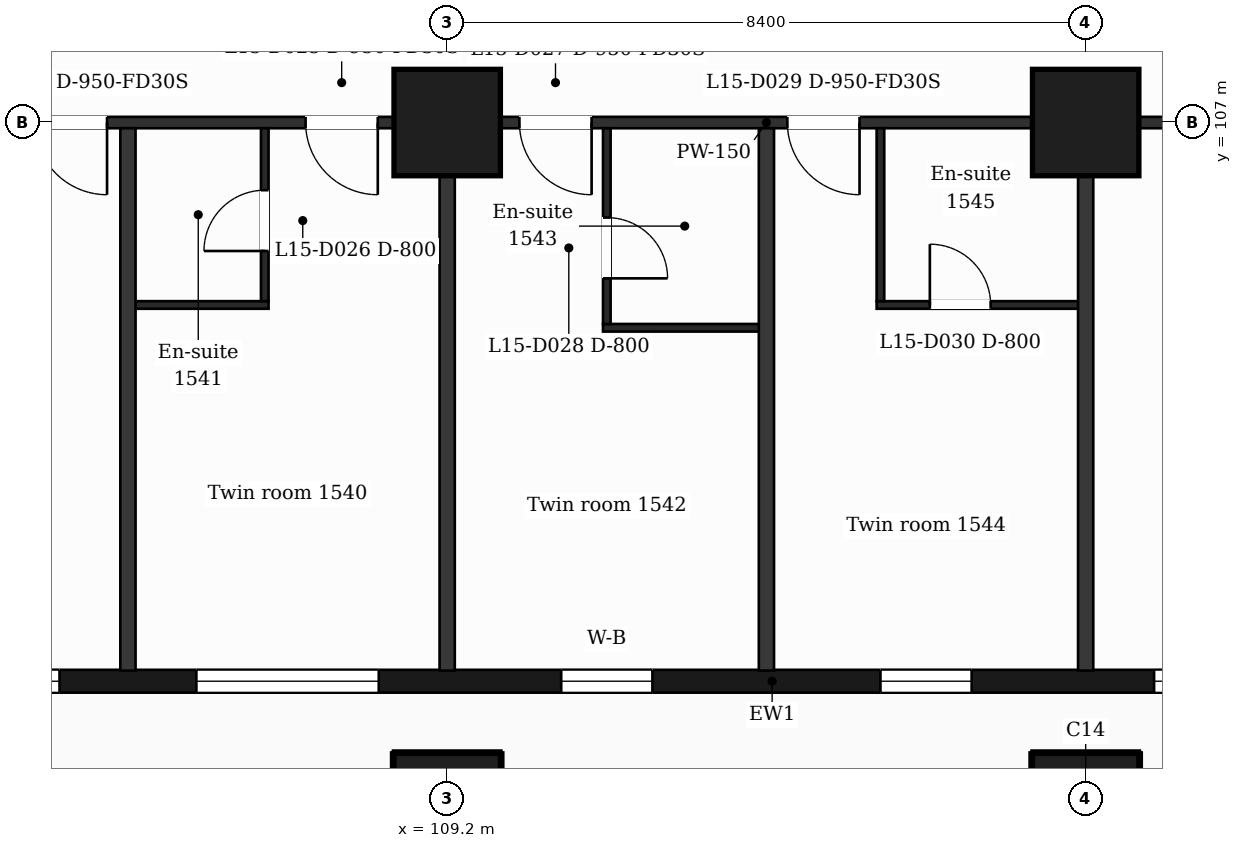
"""IFC4 building model, lengths in metres.
Left out: names, types, materials, properties, quantities, classifications, styles, units other than length and angle.
Written with IfcOpenShell. Run it as: python <this file> out.ifc"""

import sys

from ifc_helpers import new_model, si_unit, direction, frame, frame_2d, origin, origin_2d, place, context, subcontext, project, spatial, rectangle, extrude, element, fill, save


model = new_model("IFC4")
c1 = context("Model", 3, precision=1e-05, world=origin(), true_north=direction((0.0, 1.0)))
c2 = subcontext(c1, "Body", "Model", "MODEL_VIEW")
j1 = project(units=[si_unit("LENGTHUNIT", "METRE"), si_unit("PLANEANGLEUNIT", "RADIAN")], contexts=[c1])
p1 = place(None, origin())
s1 = spatial("IfcSite", under=j1, at=p1, CompositionType="ELEMENT")
p2 = place(p1, origin())
s2 = spatial("IfcBuilding", under=s1, at=p2, CompositionType="ELEMENT")
p3 = place(p2, frame((0.0, 0.0, 70.5)))
s3 = spatial("IfcBuildingStorey", under=s2, at=p3, CompositionType="ELEMENT", Elevation=70.5)
for number, where, z_axis, x_axis in (
    (1, (109.2, 98.0, 0.0), (0.0, 0.0, 1.0), (1.0, 0.0, 0.0)),
    (2, (117.6, 98.0, 0.0), (0.0, 0.0, 1.0), (1.0, 0.0, 0.0)),
    (3, (109.2, 107.0, 0.0), (0.0, 0.0, 1.0), (1.0, 0.0, 0.0)),
    (4, (117.6, 107.0, 0.0), (0.0, 0.0, 1.0), (1.0, 0.0, 0.0)),
):
    element("IfcColumn", number, at=place(p3, frame(where, z_axis=z_axis, x_axis=x_axis)), inside=s3, PredefinedType="COLUMN", context=c2, shape_type="SweptSolid", body=[
        extrude(rectangle(XDim=1.4, YDim=1.4, at=origin_2d()), origin(), (0.0, 0.0, 1.0), 3.5),
    ])
p4 = place(p3, frame((89.85, 99.65, 0.0), z_axis=(0.0, 0.0, 1.0), x_axis=(1.0, 0.0, 0.0)))
e5 = element("IfcWall", 5, at=p4, inside=s3, PredefinedType="SOLIDWALL", context=c2, shape_type="SweptSolid", body=[
    extrude(rectangle(XDim=47.25, YDim=0.3, at=frame_2d((23.625, 0.0))), origin(), (0.0, 0.0, 1.0), 3.18),
])
p5 = place(p4, frame((0.725, 0.0, 0.9)))
e6 = element("IfcOpeningElement", 6, at=p5, cuts=e5, PredefinedType="OPENING", context=c2, shape_type="SweptSolid", body=[
    extrude(rectangle(XDim=1.2, YDim=2.1, at=frame_2d((0.6, 1.05))), frame((0.0, 0.16, 0.0), z_axis=(0.0, -1.0, 0.0), x_axis=(1.0, 0.0, 0.0)), (0.0, 0.0, 1.0), 0.32),
])
p6 = place(p4, frame((3.45, 0.0, 0.9)))
e7 = element("IfcOpeningElement", 7, at=p6, cuts=e5, PredefinedType="OPENING", context=c2, shape_type="SweptSolid", body=[
    extrude(rectangle(XDim=2.4, YDim=2.1, at=frame_2d((1.2, 1.05))), frame((0.0, 0.16, 0.0), z_axis=(0.0, -1.0, 0.0), x_axis=(1.0, 0.0, 0.0)), (0.0, 0.0, 1.0), 0.32),
])
p7 = place(p4, frame((7.35, 0.0, 0.0)))
e8 = element("IfcOpeningElement", 8, at=p7, cuts=e5, PredefinedType="OPENING", context=c2, shape_type="SweptSolid", body=[
    extrude(rectangle(XDim=1.2, YDim=2.4, at=frame_2d((0.6, 1.2))), frame((0.0, 0.16, 0.0), z_axis=(0.0, -1.0, 0.0), x_axis=(1.0, 0.0, 0.0)), (0.0, 0.0, 1.0), 0.32),
])
p8 = place(p4, frame((9.15, 0.0, 0.9)))
e9 = element("IfcOpeningElement", 9, at=p8, cuts=e5, PredefinedType="OPENING", context=c2, shape_type="SweptSolid", body=[
    extrude(rectangle(XDim=1.2, YDim=2.1, at=frame_2d((0.6, 1.05))), frame((0.0, 0.16, 0.0), z_axis=(0.0, -1.0, 0.0), x_axis=(1.0, 0.0, 0.0)), (0.0, 0.0, 1.0), 0.32),
])
p9 = place(p4, frame((11.85, 0.0, 0.9)))
e10 = element("IfcOpeningElement", 10, at=p9, cuts=e5, PredefinedType="OPENING", context=c2, shape_type="SweptSolid", body=[
    extrude(rectangle(XDim=2.4, YDim=2.1, at=frame_2d((1.2, 1.05))), frame((0.0, 0.16, 0.0), z_axis=(0.0, -1.0, 0.0), x_axis=(1.0, 0.0, 0.0)), (0.0, 0.0, 1.0), 0.32),
])
p10 = place(p4, frame((16.05, 0.0, 0.9)))
e11 = element("IfcOpeningElement", 11, at=p10, cuts=e5, PredefinedType="OPENING", context=c2, shape_type="SweptSolid", body=[
    extrude(rectangle(XDim=2.4, YDim=2.1, at=frame_2d((1.2, 1.05))), frame((0.0, 0.16, 0.0), z_axis=(0.0, -1.0, 0.0), x_axis=(1.0, 0.0, 0.0)), (0.0, 0.0, 1.0), 0.32),
])
p11 = place(p4, frame((20.85, 0.0, 0.9)))
e12 = element("IfcOpeningElement", 12, at=p11, cuts=e5, PredefinedType="OPENING", context=c2, shape_type="SweptSolid", body=[
    extrude(rectangle(XDim=1.2, YDim=2.1, at=frame_2d((0.6, 1.05))), frame((0.0, 0.16, 0.0), z_axis=(0.0, -1.0, 0.0), x_axis=(1.0, 0.0, 0.0)), (0.0, 0.0, 1.0), 0.32),
])
p12 = place(p4, frame((25.05, 0.0, 0.9)))
e13 = element("IfcOpeningElement", 13, at=p12, cuts=e5, PredefinedType="OPENING", context=c2, shape_type="SweptSolid", body=[
    extrude(rectangle(XDim=1.2, YDim=2.1, at=frame_2d((0.6, 1.05))), frame((0.0, 0.16, 0.0), z_axis=(0.0, -1.0, 0.0), x_axis=(1.0, 0.0, 0.0)), (0.0, 0.0, 1.0), 0.32),
])
p13 = place(p4, frame((28.65, 0.0, 0.9)))
e14 = element("IfcOpeningElement", 14, at=p13, cuts=e5, PredefinedType="OPENING", context=c2, shape_type="SweptSolid", body=[
    extrude(rectangle(XDim=2.4, YDim=2.1, at=frame_2d((1.2, 1.05))), frame((0.0, 0.16, 0.0), z_axis=(0.0, -1.0, 0.0), x_axis=(1.0, 0.0, 0.0)), (0.0, 0.0, 1.0), 0.32),
])
p14 = place(p4, frame((32.85, 0.0, 0.9)))
e15 = element("IfcOpeningElement", 15, at=p14, cuts=e5, PredefinedType="OPENING", context=c2, shape_type="SweptSolid", body=[
    extrude(rectangle(XDim=2.4, YDim=2.1, at=frame_2d((1.2, 1.05))), frame((0.0, 0.16, 0.0), z_axis=(0.0, -1.0, 0.0), x_axis=(1.0, 0.0, 0.0)), (0.0, 0.0, 1.0), 0.32),
])
p15 = place(p4, frame((37.05, 0.0, 0.9)))
e16 = element("IfcOpeningElement", 16, at=p15, cuts=e5, PredefinedType="OPENING", context=c2, shape_type="SweptSolid", body=[
    extrude(rectangle(XDim=2.4, YDim=2.1, at=frame_2d((1.2, 1.05))), frame((0.0, 0.16, 0.0), z_axis=(0.0, -1.0, 0.0), x_axis=(1.0, 0.0, 0.0)), (0.0, 0.0, 1.0), 0.32),
])
p16 = place(p4, frame((41.25, 0.0, 0.9)))
e17 = element("IfcOpeningElement", 17, at=p16, cuts=e5, PredefinedType="OPENING", context=c2, shape_type="SweptSolid", body=[
    extrude(rectangle(XDim=2.4, YDim=2.1, at=frame_2d((1.2, 1.05))), frame((0.0, 0.16, 0.0), z_axis=(0.0, -1.0, 0.0), x_axis=(1.0, 0.0, 0.0)), (0.0, 0.0, 1.0), 0.32),
])
p17 = place(p4, frame((45.25, 0.0, 0.9)))
e18 = element("IfcOpeningElement", 18, at=p17, cuts=e5, PredefinedType="OPENING", context=c2, shape_type="SweptSolid", body=[
    extrude(rectangle(XDim=1.2, YDim=2.1, at=frame_2d((0.6, 1.05))), frame((0.0, 0.16, 0.0), z_axis=(0.0, -1.0, 0.0), x_axis=(1.0, 0.0, 0.0)), (0.0, 0.0, 1.0), 0.32),
])
p18 = place(p3, frame((111.25, 104.3, 0.0), z_axis=(0.0, 0.0, 1.0), x_axis=(1.0, 0.0, 0.0)))
e19 = element("IfcWall", 19, at=p18, inside=s3, PredefinedType="PARTITIONING", context=c2, shape_type="SweptSolid", body=[
    extrude(rectangle(XDim=2.15, YDim=0.1, at=frame_2d((1.075, 0.0))), origin(), (0.0, 0.0, 1.0), 3.18),
])
p19 = place(p3, frame((105.0, 104.6, 0.0), z_axis=(0.0, 0.0, 1.0), x_axis=(1.0, 0.0, 0.0)))
e20 = element("IfcWall", 20, at=p19, inside=s3, PredefinedType="PARTITIONING", context=c2, shape_type="SweptSolid", body=[
    extrude(rectangle(XDim=1.85, YDim=0.1, at=frame_2d((0.925, 0.0))), origin(), (0.0, 0.0, 1.0), 3.18),
])
p20 = place(p3, frame((114.85, 104.6, 0.0), z_axis=(0.0, 0.0, 1.0), x_axis=(1.0, 0.0, 0.0)))
e21 = element("IfcWall", 21, at=p20, inside=s3, PredefinedType="PARTITIONING", context=c2, shape_type="SweptSolid", body=[
    extrude(rectangle(XDim=2.75, YDim=0.1, at=frame_2d((1.375, 0.0))), origin(), (0.0, 0.0, 1.0), 3.18),
])
p21 = place(p20, frame((0.7, 0.0, 0.0)))
e22 = element("IfcOpeningElement", 22, at=p21, cuts=e21, PredefinedType="OPENING", context=c2, shape_type="SweptSolid", body=[
    extrude(rectangle(XDim=0.8, YDim=2.1, at=frame_2d((0.4, 1.05))), frame((0.0, 0.06, 0.0), z_axis=(0.0, -1.0, 0.0), x_axis=(1.0, 0.0, 0.0)), (0.0, 0.0, 1.0), 0.12),
])
p22 = place(p3, frame((87.018, 107.0, 0.0), z_axis=(0.0, 0.0, 1.0), x_axis=(1.0, 0.0, 0.0)))
e23 = element("IfcWall", 23, at=p22, inside=s3, PredefinedType="PARTITIONING", context=c2, shape_type="SweptSolid", body=[
    extrude(rectangle(XDim=52.765, YDim=0.15, at=frame_2d((26.382, 0.0))), origin(), (0.0, 0.0, 1.0), 3.18),
])
p23 = place(p22, frame((0.87, 0.0, 0.0)))
e24 = element("IfcOpeningElement", 24, at=p23, cuts=e23, PredefinedType="OPENING", context=c2, shape_type="SweptSolid", body=[
    extrude(rectangle(XDim=0.95, YDim=2.1, at=frame_2d((0.475, 1.05))), frame((0.0, 0.085, 0.0), z_axis=(0.0, -1.0, 0.0), x_axis=(1.0, 0.0, 0.0)), (0.0, 0.0, 1.0), 0.17),
])
p24 = place(p22, frame((6.332, 0.0, 0.0)))
e25 = element("IfcOpeningElement", 25, at=p24, cuts=e23, PredefinedType="OPENING", context=c2, shape_type="SweptSolid", body=[
    extrude(rectangle(XDim=0.95, YDim=2.1, at=frame_2d((0.475, 1.05))), frame((0.0, 0.085, 0.0), z_axis=(0.0, -1.0, 0.0), x_axis=(1.0, 0.0, 0.0)), (0.0, 0.0, 1.0), 0.17),
])
p25 = place(p22, frame((11.882, 0.0, 0.0)))
e26 = element("IfcOpeningElement", 26, at=p25, cuts=e23, PredefinedType="OPENING", context=c2, shape_type="SweptSolid", body=[
    extrude(rectangle(XDim=0.95, YDim=2.1, at=frame_2d((0.475, 1.05))), frame((0.0, 0.085, 0.0), z_axis=(0.0, -1.0, 0.0), x_axis=(1.0, 0.0, 0.0)), (0.0, 0.0, 1.0), 0.17),
])
p26 = place(p22, frame((16.757, 0.0, 0.0)))
e27 = element("IfcOpeningElement", 27, at=p26, cuts=e23, PredefinedType="OPENING", context=c2, shape_type="SweptSolid", body=[
    extrude(rectangle(XDim=0.95, YDim=2.1, at=frame_2d((0.475, 1.05))), frame((0.0, 0.085, 0.0), z_axis=(0.0, -1.0, 0.0), x_axis=(1.0, 0.0, 0.0)), (0.0, 0.0, 1.0), 0.17),
])
p27 = place(p22, frame((20.319, 0.0, 0.0)))
e28 = element("IfcOpeningElement", 28, at=p27, cuts=e23, PredefinedType="OPENING", context=c2, shape_type="SweptSolid", body=[
    extrude(rectangle(XDim=0.95, YDim=2.1, at=frame_2d((0.475, 1.05))), frame((0.0, 0.085, 0.0), z_axis=(0.0, -1.0, 0.0), x_axis=(1.0, 0.0, 0.0)), (0.0, 0.0, 1.0), 0.17),
])
p28 = place(p22, frame((23.132, 0.0, 0.0)))
e29 = element("IfcOpeningElement", 29, at=p28, cuts=e23, PredefinedType="OPENING", context=c2, shape_type="SweptSolid", body=[
    extrude(rectangle(XDim=0.95, YDim=2.1, at=frame_2d((0.475, 1.05))), frame((0.0, 0.085, 0.0), z_axis=(0.0, -1.0, 0.0), x_axis=(1.0, 0.0, 0.0)), (0.0, 0.0, 1.0), 0.17),
])
p29 = place(p22, frame((26.657, 0.0, 0.0)))
e30 = element("IfcOpeningElement", 30, at=p29, cuts=e23, PredefinedType="OPENING", context=c2, shape_type="SweptSolid", body=[
    extrude(rectangle(XDim=0.95, YDim=2.1, at=frame_2d((0.475, 1.05))), frame((0.0, 0.085, 0.0), z_axis=(0.0, -1.0, 0.0), x_axis=(1.0, 0.0, 0.0)), (0.0, 0.0, 1.0), 0.17),
])
p30 = place(p22, frame((34.952, 0.0, 0.0)))
e31 = element("IfcOpeningElement", 31, at=p30, cuts=e23, PredefinedType="OPENING", context=c2, shape_type="SweptSolid", body=[
    extrude(rectangle(XDim=1.0, YDim=2.1, at=frame_2d((0.5, 1.05))), frame((0.0, 0.085, 0.0), z_axis=(0.0, -1.0, 0.0), x_axis=(1.0, 0.0, 0.0)), (0.0, 0.0, 1.0), 0.17),
])
p31 = place(p22, frame((45.062, 0.0, 0.0)))
e32 = element("IfcOpeningElement", 32, at=p31, cuts=e23, PredefinedType="OPENING", context=c2, shape_type="SweptSolid", body=[
    extrude(rectangle(XDim=0.95, YDim=2.1, at=frame_2d((0.475, 1.05))), frame((0.0, 0.085, 0.0), z_axis=(0.0, -1.0, 0.0), x_axis=(1.0, 0.0, 0.0)), (0.0, 0.0, 1.0), 0.17),
])
p32 = place(p22, frame((49.285, 0.0, 0.0)))
e33 = element("IfcOpeningElement", 33, at=p32, cuts=e23, PredefinedType="OPENING", context=c2, shape_type="SweptSolid", body=[
    extrude(rectangle(XDim=0.95, YDim=2.1, at=frame_2d((0.475, 1.05))), frame((0.0, 0.085, 0.0), z_axis=(0.0, -1.0, 0.0), x_axis=(1.0, 0.0, 0.0)), (0.0, 0.0, 1.0), 0.17),
])
p33 = place(p3, frame((105.0, 99.79, 0.0), z_axis=(0.0, 0.0, 1.0), x_axis=(0.0, 1.0, 0.0)))
e34 = element("IfcWall", 34, at=p33, inside=s3, PredefinedType="PARTITIONING", context=c2, shape_type="SweptSolid", body=[
    extrude(rectangle(XDim=7.135, YDim=0.2, at=frame_2d((3.567, 0.0))), origin(), (0.0, 0.0, 1.0), 3.18),
])
p34 = place(p3, frame((106.8, 104.65, 0.0), z_axis=(0.0, 0.0, 1.0), x_axis=(0.0, 1.0, 0.0)))
e35 = element("IfcWall", 35, at=p34, inside=s3, PredefinedType="PARTITIONING", context=c2, shape_type="SweptSolid", body=[
    extrude(rectangle(XDim=2.275, YDim=0.1, at=frame_2d((1.138, 0.0))), origin(), (0.0, 0.0, 1.0), 3.18),
])
p35 = place(p34, frame((0.66, 0.0, 0.0)))
e36 = element("IfcOpeningElement", 36, at=p35, cuts=e35, PredefinedType="OPENING", context=c2, shape_type="SweptSolid", body=[
    extrude(rectangle(XDim=0.8, YDim=2.1, at=frame_2d((0.4, 1.05))), frame((0.0, 0.06, 0.0), z_axis=(0.0, -1.0, 0.0), x_axis=(1.0, 0.0, 0.0)), (0.0, 0.0, 1.0), 0.12),
])
p36 = place(p3, frame((109.2, 99.79, 0.0), z_axis=(0.0, 0.0, 1.0), x_axis=(0.0, 1.0, 0.0)))
e37 = element("IfcWall", 37, at=p36, inside=s3, PredefinedType="PARTITIONING", context=c2, shape_type="SweptSolid", body=[
    extrude(rectangle(XDim=7.135, YDim=0.2, at=frame_2d((3.567, 0.0))), origin(), (0.0, 0.0, 1.0), 3.18),
])
p37 = place(p3, frame((111.3, 104.35, 0.0), z_axis=(0.0, 0.0, 1.0), x_axis=(0.0, 1.0, 0.0)))
e38 = element("IfcWall", 38, at=p37, inside=s3, PredefinedType="PARTITIONING", context=c2, shape_type="SweptSolid", body=[
    extrude(rectangle(XDim=2.575, YDim=0.1, at=frame_2d((1.288, 0.0))), origin(), (0.0, 0.0, 1.0), 3.18),
])
p38 = place(p37, frame((0.6, 0.0, 0.0)))
e39 = element("IfcOpeningElement", 39, at=p38, cuts=e38, PredefinedType="OPENING", context=c2, shape_type="SweptSolid", body=[
    extrude(rectangle(XDim=0.8, YDim=2.1, at=frame_2d((0.4, 1.05))), frame((0.0, 0.06, 0.0), z_axis=(0.0, -1.0, 0.0), x_axis=(1.0, 0.0, 0.0)), (0.0, 0.0, 1.0), 0.12),
])
p39 = place(p3, frame((113.4, 99.79, 0.0), z_axis=(0.0, 0.0, 1.0), x_axis=(0.0, 1.0, 0.0)))
e40 = element("IfcWall", 40, at=p39, inside=s3, PredefinedType="PARTITIONING", context=c2, shape_type="SweptSolid", body=[
    extrude(rectangle(XDim=7.135, YDim=0.2, at=frame_2d((3.567, 0.0))), origin(), (0.0, 0.0, 1.0), 3.18),
])
p40 = place(p3, frame((114.9, 104.65, 0.0), z_axis=(0.0, 0.0, 1.0), x_axis=(0.0, 1.0, 0.0)))
e41 = element("IfcWall", 41, at=p40, inside=s3, PredefinedType="PARTITIONING", context=c2, shape_type="SweptSolid", body=[
    extrude(rectangle(XDim=2.275, YDim=0.1, at=frame_2d((1.138, 0.0))), origin(), (0.0, 0.0, 1.0), 3.18),
])
p41 = place(p3, frame((117.6, 99.79, 0.0), z_axis=(0.0, 0.0, 1.0), x_axis=(0.0, 1.0, 0.0)))
e42 = element("IfcWall", 42, at=p41, inside=s3, PredefinedType="PARTITIONING", context=c2, shape_type="SweptSolid", body=[
    extrude(rectangle(XDim=7.135, YDim=0.2, at=frame_2d((3.567, 0.0))), origin(), (0.0, 0.0, 1.0), 3.18),
])
p42 = place(p9, origin())
e43 = element("IfcWindow", 43, at=p42, inside=s3, PartitioningType="SINGLE_PANEL", PredefinedType="WINDOW", context=c2, shape_type="SweptSolid", body=[
    extrude(rectangle(XDim=2.4, YDim=2.1, at=frame_2d((1.2, 1.05))), frame((0.0, 0.03, 0.0), z_axis=(0.0, -1.0, 0.0), x_axis=(1.0, 0.0, 0.0)), (0.0, 0.0, 1.0), 0.06),
])
fill(e10, e43)
p43 = place(p10, origin())
e44 = element("IfcWindow", 44, at=p43, inside=s3, PartitioningType="SINGLE_PANEL", PredefinedType="WINDOW", context=c2, shape_type="SweptSolid", body=[
    extrude(rectangle(XDim=2.4, YDim=2.1, at=frame_2d((1.2, 1.05))), frame((0.0, 0.03, 0.0), z_axis=(0.0, -1.0, 0.0), x_axis=(1.0, 0.0, 0.0)), (0.0, 0.0, 1.0), 0.06),
])
fill(e11, e44)
p44 = place(p11, origin())
e45 = element("IfcWindow", 45, at=p44, inside=s3, PartitioningType="SINGLE_PANEL", PredefinedType="WINDOW", context=c2, shape_type="SweptSolid", body=[
    extrude(rectangle(XDim=1.2, YDim=2.1, at=frame_2d((0.6, 1.05))), frame((0.0, 0.03, 0.0), z_axis=(0.0, -1.0, 0.0), x_axis=(1.0, 0.0, 0.0)), (0.0, 0.0, 1.0), 0.06),
])
fill(e12, e45)
p45 = place(p12, origin())
e46 = element("IfcWindow", 46, at=p45, inside=s3, PartitioningType="SINGLE_PANEL", PredefinedType="WINDOW", context=c2, shape_type="SweptSolid", body=[
    extrude(rectangle(XDim=1.2, YDim=2.1, at=frame_2d((0.6, 1.05))), frame((0.0, 0.03, 0.0), z_axis=(0.0, -1.0, 0.0), x_axis=(1.0, 0.0, 0.0)), (0.0, 0.0, 1.0), 0.06),
])
fill(e13, e46)
p46 = place(p13, origin())
e47 = element("IfcWindow", 47, at=p46, inside=s3, PartitioningType="SINGLE_PANEL", PredefinedType="WINDOW", context=c2, shape_type="SweptSolid", body=[
    extrude(rectangle(XDim=2.4, YDim=2.1, at=frame_2d((1.2, 1.05))), frame((0.0, 0.03, 0.0), z_axis=(0.0, -1.0, 0.0), x_axis=(1.0, 0.0, 0.0)), (0.0, 0.0, 1.0), 0.06),
])
fill(e14, e47)
p47 = place(p26, origin())
e48 = element("IfcDoor", 48, at=p47, inside=s3, OperationType="SINGLE_SWING_RIGHT", PredefinedType="DOOR", context=c2, shape_type="SweptSolid", body=[
    extrude(rectangle(XDim=0.95, YDim=2.1, at=frame_2d((0.475, 1.05))), frame((0.0, 0.025, 0.0), z_axis=(0.0, -1.0, 0.0), x_axis=(1.0, 0.0, 0.0)), (0.0, 0.0, 1.0), 0.05),
])
fill(e27, e48)
p48 = place(p27, origin())
e49 = element("IfcDoor", 49, at=p48, inside=s3, OperationType="SINGLE_SWING_RIGHT", PredefinedType="DOOR", context=c2, shape_type="SweptSolid", body=[
    extrude(rectangle(XDim=0.95, YDim=2.1, at=frame_2d((0.475, 1.05))), frame((0.0, 0.025, 0.0), z_axis=(0.0, -1.0, 0.0), x_axis=(1.0, 0.0, 0.0)), (0.0, 0.0, 1.0), 0.05),
])
fill(e28, e49)
p49 = place(p35, origin())
e50 = element("IfcDoor", 50, at=p49, inside=s3, OperationType="SINGLE_SWING_LEFT", PredefinedType="DOOR", context=c2, shape_type="SweptSolid", body=[
    extrude(rectangle(XDim=0.8, YDim=2.1, at=frame_2d((0.4, 1.05))), frame((0.0, 0.025, 0.0), z_axis=(0.0, -1.0, 0.0), x_axis=(1.0, 0.0, 0.0)), (0.0, 0.0, 1.0), 0.05),
])
fill(e36, e50)
p50 = place(p28, origin())
e51 = element("IfcDoor", 51, at=p50, inside=s3, OperationType="SINGLE_SWING_RIGHT", PredefinedType="DOOR", context=c2, shape_type="SweptSolid", body=[
    extrude(rectangle(XDim=0.95, YDim=2.1, at=frame_2d((0.475, 1.05))), frame((0.0, 0.025, 0.0), z_axis=(0.0, -1.0, 0.0), x_axis=(1.0, 0.0, 0.0)), (0.0, 0.0, 1.0), 0.05),
])
fill(e29, e51)
p51 = place(p38, origin())
e52 = element("IfcDoor", 52, at=p51, inside=s3, OperationType="SINGLE_SWING_LEFT", PredefinedType="DOOR", context=c2, shape_type="SweptSolid", body=[
    extrude(rectangle(XDim=0.8, YDim=2.1, at=frame_2d((0.4, 1.05))), frame((0.0, 0.025, 0.0), z_axis=(0.0, -1.0, 0.0), x_axis=(1.0, 0.0, 0.0)), (0.0, 0.0, 1.0), 0.05),
])
fill(e39, e52)
p52 = place(p29, origin())
e53 = element("IfcDoor", 53, at=p52, inside=s3, OperationType="SINGLE_SWING_RIGHT", PredefinedType="DOOR", context=c2, shape_type="SweptSolid", body=[
    extrude(rectangle(XDim=0.95, YDim=2.1, at=frame_2d((0.475, 1.05))), frame((0.0, 0.025, 0.0), z_axis=(0.0, -1.0, 0.0), x_axis=(1.0, 0.0, 0.0)), (0.0, 0.0, 1.0), 0.05),
])
fill(e30, e53)
p53 = place(p21, origin())
e54 = element("IfcDoor", 54, at=p53, inside=s3, OperationType="SINGLE_SWING_LEFT", PredefinedType="DOOR", context=c2, shape_type="SweptSolid", body=[
    extrude(rectangle(XDim=0.8, YDim=2.1, at=frame_2d((0.4, 1.05))), frame((0.0, 0.025, 0.0), z_axis=(0.0, -1.0, 0.0), x_axis=(1.0, 0.0, 0.0)), (0.0, 0.0, 1.0), 0.05),
])
fill(e22, e54)
save(model, sys.argv[1])
